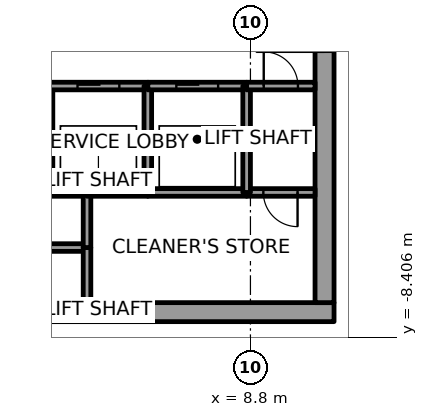
"""IFC4 building model, lengths in metres.
Left out: names, types, materials, properties, quantities, classifications, styles, units other than length and angle.
Written with IfcOpenShell. Run it as: python <this file> out.ifc"""

import sys

from ifc_helpers import new_model, si_unit, direction, frame, frame_2d, origin, place, context, subcontext, project, spatial, rectangle, extrude, element, fill, save


model = new_model("IFC4")
c1 = context("Model", 3, precision=1e-05, world=origin(), true_north=direction((0.0, 1.0)))
c2 = subcontext(c1, "Body", "Model", "MODEL_VIEW")
j1 = project(units=[si_unit("LENGTHUNIT", "METRE"), si_unit("PLANEANGLEUNIT", "RADIAN")], contexts=[c1])
p1 = place(None, origin())
s1 = spatial("IfcSite", under=j1, at=p1, CompositionType="ELEMENT")
p2 = place(p1, origin())
s2 = spatial("IfcBuilding", under=s1, at=p2, CompositionType="ELEMENT")
p3 = place(p2, frame((0.0, 0.0, 118.6)))
s3 = spatial("IfcBuildingStorey", under=s2, at=p3, CompositionType="ELEMENT", Elevation=118.6)
p4 = place(p3, frame((-11.0, -7.75, 0.0), z_axis=(0.0, 0.0, 1.0), x_axis=(1.0, 0.0, 0.0)))
e1 = element("IfcWall", 1, at=p4, inside=s3, PredefinedType="SHEAR", context=c2, shape_type="SweptSolid", body=[
    extrude(rectangle(XDim=22.0, YDim=0.5, at=frame_2d((11.0, 0.0))), origin(), (0.0, 0.0, 1.0), 7.2),
])
p5 = place(p4, frame((10.45, 0.0, 0.0)))
e2 = element("IfcOpeningElement", 2, at=p5, cuts=e1, PredefinedType="OPENING", context=c2, shape_type="SweptSolid", body=[
    extrude(rectangle(XDim=1.1, YDim=2.1, at=frame_2d((0.55, 1.05))), frame((0.0, 0.25, 0.0), z_axis=(0.0, -1.0, 0.0), x_axis=(1.0, 0.0, 0.0)), (0.0, 0.0, 1.0), 0.5),
])
p6 = place(p3, frame((10.75, -7.5, 0.0), z_axis=(0.0, 0.0, 1.0), x_axis=(0.0, 1.0, 0.0)))
e3 = element("IfcWall", 3, at=p6, inside=s3, PredefinedType="SHEAR", context=c2, shape_type="SweptSolid", body=[
    extrude(rectangle(XDim=15.0, YDim=0.5, at=frame_2d((7.5, 0.0))), origin(), (0.0, 0.0, 1.0), 7.2),
])
p7 = place(p6, frame((6.6, 0.0, 0.0)))
e4 = element("IfcOpeningElement", 4, at=p7, cuts=e3, PredefinedType="OPENING", context=c2, shape_type="SweptSolid", body=[
    extrude(rectangle(XDim=1.8, YDim=2.1, at=frame_2d((0.9, 1.05))), frame((0.0, 0.25, 0.0), z_axis=(0.0, -1.0, 0.0), x_axis=(1.0, 0.0, 0.0)), (0.0, 0.0, 1.0), 0.5),
])
p8 = place(p3, frame((4.5, -6.05, 0.0), z_axis=(0.0, 0.0, 1.0), x_axis=(-1.0, 0.0, 0.0)))
e5 = element("IfcWall", 5, at=p8, inside=s3, PredefinedType="SOLIDWALL", context=c2, shape_type="SweptSolid", body=[
    extrude(rectangle(XDim=2.9, YDim=0.2, at=frame_2d((1.45, 0.0))), origin(), (0.0, 0.0, 1.0), 7.05),
])
p9 = place(p3, frame((4.5, -4.6, 0.0), z_axis=(0.0, 0.0, 1.0), x_axis=(-1.0, 0.0, 0.0)))
e6 = element("IfcWall", 6, at=p9, inside=s3, PredefinedType="SOLIDWALL", context=c2, shape_type="SweptSolid", body=[
    extrude(rectangle(XDim=1.0, YDim=0.2, at=frame_2d((0.5, 0.0))), origin(), (0.0, 0.0, 1.0), 7.05),
])
p10 = place(p3, frame((3.5, -1.8, 0.0), z_axis=(0.0, 0.0, 1.0), x_axis=(1.0, 0.0, 0.0)))
e7 = element("IfcWall", 7, at=p10, inside=s3, PredefinedType="SOLIDWALL", context=c2, shape_type="SweptSolid", body=[
    extrude(rectangle(XDim=2.6, YDim=0.2, at=frame_2d((1.3, 0.0))), origin(), (0.0, 0.0, 1.0), 7.05),
])
p11 = place(p10, frame((0.75, 0.0, 0.0)))
e8 = element("IfcOpeningElement", 8, at=p11, cuts=e7, PredefinedType="OPENING", context=c2, shape_type="SweptSolid", body=[
    extrude(rectangle(XDim=1.1, YDim=2.1, at=frame_2d((0.55, 1.05))), frame((0.0, 0.1, 0.0), z_axis=(0.0, -1.0, 0.0), x_axis=(1.0, 0.0, 0.0)), (0.0, 0.0, 1.0), 0.2),
])
for number, where, z_axis, x_axis in (
    (9, (4.5, -6.05, 0.0), (0.0, 0.0, 1.0), (0.0, -1.0, 0.0)),
    (10, (4.5, -4.6, 0.0), (0.0, 0.0, 1.0), (0.0, -1.0, 0.0)),
):
    element("IfcWall", number, at=place(p3, frame(where, z_axis=z_axis, x_axis=x_axis)), inside=s3, PredefinedType="SOLIDWALL", context=c2, shape_type="SweptSolid", body=[
        extrude(rectangle(XDim=1.45, YDim=0.2, at=frame_2d((0.725, 0.0))), origin(), (0.0, 0.0, 1.0), 7.05),
    ])
p12 = place(p3, frame((6.1, -4.6, 0.0), z_axis=(0.0, 0.0, 1.0), x_axis=(-1.0, 0.0, 0.0)))
e11 = element("IfcWall", 11, at=p12, inside=s3, PredefinedType="SOLIDWALL", context=c2, shape_type="SweptSolid", body=[
    extrude(rectangle(XDim=1.6, YDim=0.2, at=frame_2d((0.8, 0.0))), origin(), (0.0, 0.0, 1.0), 7.05),
])
p13 = place(p3, frame((8.7, -4.6, 0.0), z_axis=(0.0, 0.0, 1.0), x_axis=(-1.0, 0.0, 0.0)))
e12 = element("IfcWall", 12, at=p13, inside=s3, PredefinedType="SOLIDWALL", context=c2, shape_type="SweptSolid", body=[
    extrude(rectangle(XDim=2.6, YDim=0.2, at=frame_2d((1.3, 0.0))), origin(), (0.0, 0.0, 1.0), 7.05),
])
p14 = place(p3, frame((6.1, -4.6, 0.0), z_axis=(0.0, 0.0, 1.0), x_axis=(0.0, 1.0, 0.0)))
e13 = element("IfcWall", 13, at=p14, inside=s3, PredefinedType="SOLIDWALL", context=c2, shape_type="SweptSolid", body=[
    extrude(rectangle(XDim=2.8, YDim=0.2, at=frame_2d((1.4, 0.0))), origin(), (0.0, 0.0, 1.0), 7.05),
])
p15 = place(p3, frame((6.1, -1.8, 0.0), z_axis=(0.0, 0.0, 1.0), x_axis=(1.0, 0.0, 0.0)))
e14 = element("IfcWall", 14, at=p15, inside=s3, PredefinedType="SOLIDWALL", context=c2, shape_type="SweptSolid", body=[
    extrude(rectangle(XDim=2.6, YDim=0.2, at=frame_2d((1.3, 0.0))), origin(), (0.0, 0.0, 1.0), 7.05),
])
p16 = place(p15, frame((0.75, 0.0, 0.0)))
e15 = element("IfcOpeningElement", 15, at=p16, cuts=e14, PredefinedType="OPENING", context=c2, shape_type="SweptSolid", body=[
    extrude(rectangle(XDim=1.1, YDim=2.1, at=frame_2d((0.55, 1.05))), frame((0.0, 0.1, 0.0), z_axis=(0.0, -1.0, 0.0), x_axis=(1.0, 0.0, 0.0)), (0.0, 0.0, 1.0), 0.2),
])
p17 = place(p3, frame((10.5, -4.6, 0.0), z_axis=(0.0, 0.0, 1.0), x_axis=(-1.0, 0.0, 0.0)))
e16 = element("IfcWall", 16, at=p17, inside=s3, PredefinedType="SOLIDWALL", context=c2, shape_type="SweptSolid", body=[
    extrude(rectangle(XDim=1.8, YDim=0.2, at=frame_2d((0.9, 0.0))), origin(), (0.0, 0.0, 1.0), 7.05),
])
p18 = place(p17, frame((0.46, 0.0, 0.0)))
e17 = element("IfcOpeningElement", 17, at=p18, cuts=e16, PredefinedType="OPENING", context=c2, shape_type="SweptSolid", body=[
    extrude(rectangle(XDim=0.9, YDim=2.1, at=frame_2d((0.45, 1.05))), frame((0.0, 0.1, 0.0), z_axis=(0.0, -1.0, 0.0), x_axis=(1.0, 0.0, 0.0)), (0.0, 0.0, 1.0), 0.2),
])
p19 = place(p3, frame((8.7, -1.8, 0.0), z_axis=(0.0, 0.0, 1.0), x_axis=(0.0, -1.0, 0.0)))
e18 = element("IfcWall", 18, at=p19, inside=s3, PredefinedType="SOLIDWALL", context=c2, shape_type="SweptSolid", body=[
    extrude(rectangle(XDim=2.8, YDim=0.2, at=frame_2d((1.4, 0.0))), origin(), (0.0, 0.0, 1.0), 7.05),
])
p20 = place(p3, frame((8.7, -1.8, 0.0), z_axis=(0.0, 0.0, 1.0), x_axis=(1.0, 0.0, 0.0)))
e19 = element("IfcWall", 19, at=p20, inside=s3, PredefinedType="SOLIDWALL", context=c2, shape_type="SweptSolid", body=[
    extrude(rectangle(XDim=1.8, YDim=0.2, at=frame_2d((0.9, 0.0))), origin(), (0.0, 0.0, 1.0), 7.05),
])
p21 = place(p20, frame((0.45, 0.0, 0.0)))
e20 = element("IfcOpeningElement", 20, at=p21, cuts=e19, PredefinedType="OPENING", context=c2, shape_type="SweptSolid", body=[
    extrude(rectangle(XDim=0.9, YDim=2.1, at=frame_2d((0.45, 1.05))), frame((0.0, 0.1, 0.0), z_axis=(0.0, -1.0, 0.0), x_axis=(1.0, 0.0, 0.0)), (0.0, 0.0, 1.0), 0.2),
])
p22 = place(p11, origin())
e21 = element("IfcDoor", 21, at=p22, inside=s3, OperationType="SLIDING_TO_RIGHT", PredefinedType="DOOR", context=c2, shape_type="SweptSolid", body=[
    extrude(rectangle(XDim=1.1, YDim=2.1, at=frame_2d((0.55, 1.05))), frame((0.0, 0.025, 0.0), z_axis=(0.0, -1.0, 0.0), x_axis=(1.0, 0.0, 0.0)), (0.0, 0.0, 1.0), 0.05),
])
fill(e8, e21)
p23 = place(p16, origin())
e22 = element("IfcDoor", 22, at=p23, inside=s3, OperationType="SLIDING_TO_RIGHT", PredefinedType="DOOR", context=c2, shape_type="SweptSolid", body=[
    extrude(rectangle(XDim=1.1, YDim=2.1, at=frame_2d((0.55, 1.05))), frame((0.0, 0.025, 0.0), z_axis=(0.0, -1.0, 0.0), x_axis=(1.0, 0.0, 0.0)), (0.0, 0.0, 1.0), 0.05),
])
fill(e15, e22)
p24 = place(p18, origin())
e23 = element("IfcDoor", 23, at=p24, inside=s3, OperationType="SINGLE_SWING_RIGHT", PredefinedType="DOOR", context=c2, shape_type="SweptSolid", body=[
    extrude(rectangle(XDim=0.9, YDim=2.1, at=frame_2d((0.45, 1.05))), frame((0.0, 0.025, 0.0), z_axis=(0.0, -1.0, 0.0), x_axis=(1.0, 0.0, 0.0)), (0.0, 0.0, 1.0), 0.05),
])
fill(e17, e23)
p25 = place(p21, origin())
e24 = element("IfcDoor", 24, at=p25, inside=s3, OperationType="SINGLE_SWING_RIGHT", PredefinedType="DOOR", context=c2, shape_type="SweptSolid", body=[
    extrude(rectangle(XDim=0.9, YDim=2.1, at=frame_2d((0.45, 1.05))), frame((0.0, 0.025, 0.0), z_axis=(0.0, -1.0, 0.0), x_axis=(1.0, 0.0, 0.0)), (0.0, 0.0, 1.0), 0.05),
])
fill(e20, e24)
p26 = place(p7, origin())
e25 = element("IfcDoor", 25, at=p26, inside=s3, OperationType="DOUBLE_DOOR_SINGLE_SWING", PredefinedType="DOOR", context=c2, shape_type="SweptSolid", body=[
    extrude(rectangle(XDim=1.8, YDim=2.1, at=frame_2d((0.9, 1.05))), frame((0.0, 0.025, 0.0), z_axis=(0.0, -1.0, 0.0), x_axis=(1.0, 0.0, 0.0)), (0.0, 0.0, 1.0), 0.05),
])
fill(e4, e25)
save(model, sys.argv[1])
